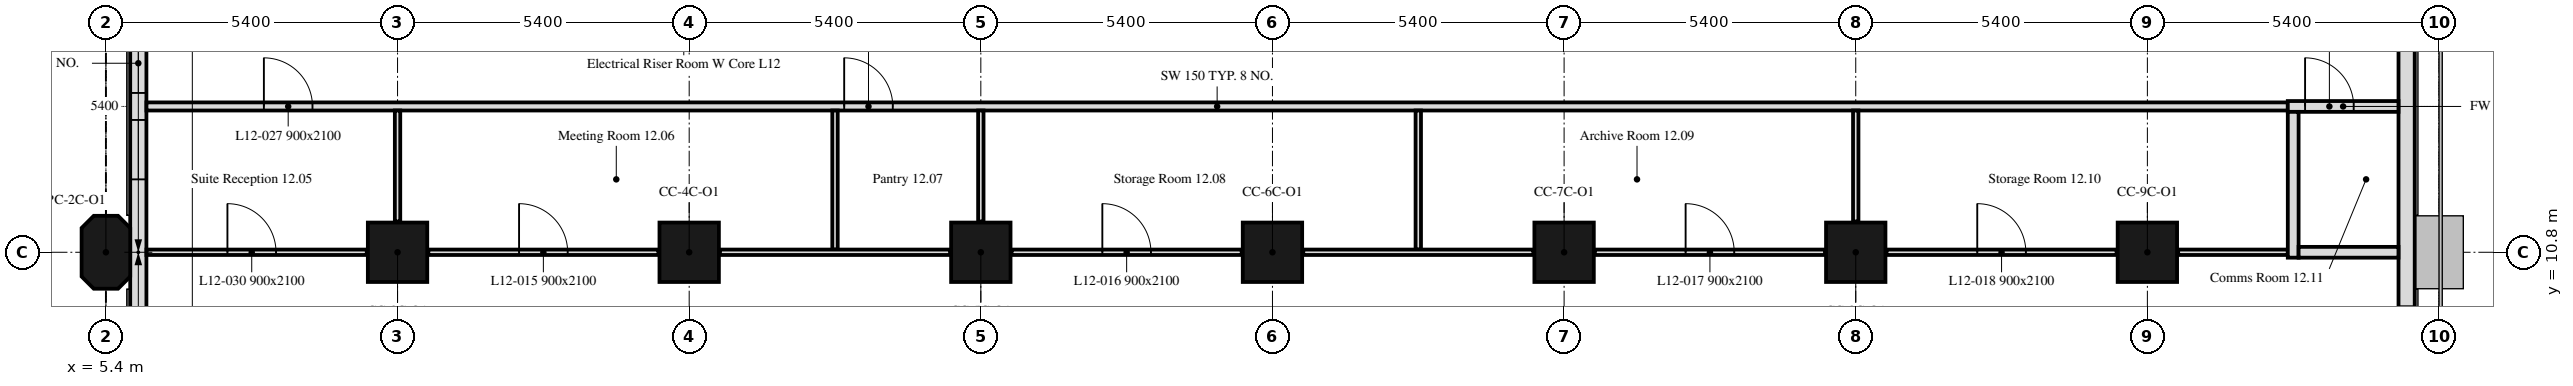
"""IFC4 building model, lengths in metres.
Left out: names, types, materials, properties, quantities, classifications, styles, units other than length and angle.
Written with IfcOpenShell. Run it as: python <this file> out.ifc"""

import sys

from ifc_helpers import new_model, si_unit, direction, frame, frame_2d, origin, origin_2d, place, context, subcontext, project, spatial, polyline, rectangle, outline, extrude, element, fill, save


model = new_model("IFC4")
c1 = context("Model", 3, precision=1e-05, world=origin(), true_north=direction((0.0, 1.0)))
c2 = subcontext(c1, "Body", "Model", "MODEL_VIEW")
j1 = project(units=[si_unit("LENGTHUNIT", "METRE"), si_unit("PLANEANGLEUNIT", "RADIAN")], contexts=[c1])
p1 = place(None, origin())
s1 = spatial("IfcSite", under=j1, at=p1, CompositionType="ELEMENT")
p2 = place(p1, origin())
s2 = spatial("IfcBuilding", under=s1, at=p2, CompositionType="ELEMENT")
p3 = place(p2, frame((0.0, 0.0, 56.4)))
s3 = spatial("IfcBuildingStorey", under=s2, at=p3, CompositionType="ELEMENT", Elevation=56.4)
p4 = place(p3, frame((5.4, 10.8, 0.0), z_axis=(0.0, 0.0, 1.0), x_axis=(0.0, 1.0, 0.0)))
e1 = element("IfcColumn", 1, at=p4, inside=s3, PredefinedType="COLUMN", context=c2, shape_type="SweptSolid", body=[
    extrude(outline(polyline([(-0.45, -0.45), (0.45, -0.45), (0.675, -0.225), (0.675, 0.225), (0.45, 0.45), (-0.45, 0.45), (-0.675, 0.225), (-0.675, -0.225), (-0.45, -0.45)])), origin(), (0.0, 0.0, 1.0), 3.3),
])
for number, where, z_axis, x_axis in (
    (2, (10.8, 10.8, 0.0), (0.0, 0.0, 1.0), (1.0, 0.0, 0.0)),
    (3, (16.2, 10.8, 0.0), (0.0, 0.0, 1.0), (1.0, 0.0, 0.0)),
    (4, (21.6, 10.8, 0.0), (0.0, 0.0, 1.0), (1.0, 0.0, 0.0)),
    (5, (27.0, 10.8, 0.0), (0.0, 0.0, 1.0), (1.0, 0.0, 0.0)),
    (6, (32.4, 10.8, 0.0), (0.0, 0.0, 1.0), (1.0, 0.0, 0.0)),
    (7, (37.8, 10.8, 0.0), (0.0, 0.0, 1.0), (1.0, 0.0, 0.0)),
    (8, (43.2, 10.8, 0.0), (0.0, 0.0, 1.0), (1.0, 0.0, 0.0)),
):
    element("IfcColumn", number, at=place(p3, frame(where, z_axis=z_axis, x_axis=x_axis)), inside=s3, PredefinedType="COLUMN", context=c2, shape_type="SweptSolid", body=[
        extrude(rectangle(XDim=1.1, YDim=1.1, at=origin_2d()), origin(), (0.0, 0.0, 1.0), 3.3),
    ])
p5 = place(p3, frame((48.0, 5.586, 0.0), z_axis=(0.0, 0.0, 1.0), x_axis=(0.0, 1.0, 0.0)))
e9 = element("IfcWall", 9, at=p5, inside=s3, PredefinedType="SOLIDWALL", context=c2, shape_type="SweptSolid", body=[
    extrude(rectangle(XDim=32.027, YDim=0.3, at=frame_2d((16.014, 0.0))), origin(), (0.0, 0.0, 1.0), 3.3),
])
p6 = place(p5, frame((0.814, 0.0, 0.9)))
e10 = element("IfcOpeningElement", 10, at=p6, cuts=e9, PredefinedType="OPENING", context=c2, shape_type="SweptSolid", body=[
    extrude(rectangle(XDim=3.4, YDim=1.7, at=frame_2d((1.7, 0.85))), frame((0.0, 0.16, 0.0), z_axis=(0.0, -1.0, 0.0), x_axis=(1.0, 0.0, 0.0)), (0.0, 0.0, 1.0), 0.32),
])
p7 = place(p5, frame((11.614, 0.0, 0.9)))
e11 = element("IfcOpeningElement", 11, at=p7, cuts=e9, PredefinedType="OPENING", context=c2, shape_type="SweptSolid", body=[
    extrude(rectangle(XDim=3.4, YDim=1.7, at=frame_2d((1.7, 0.85))), frame((0.0, 0.16, 0.0), z_axis=(0.0, -1.0, 0.0), x_axis=(1.0, 0.0, 0.0)), (0.0, 0.0, 1.0), 0.32),
])
p8 = place(p5, frame((22.414, 0.0, 0.9)))
e12 = element("IfcOpeningElement", 12, at=p8, cuts=e9, PredefinedType="OPENING", context=c2, shape_type="SweptSolid", body=[
    extrude(rectangle(XDim=3.4, YDim=1.7, at=frame_2d((1.7, 0.85))), frame((0.0, 0.16, 0.0), z_axis=(0.0, -1.0, 0.0), x_axis=(1.0, 0.0, 0.0)), (0.0, 0.0, 1.0), 0.32),
])
p9 = place(p3, frame((6.0, 16.2, 0.0), z_axis=(0.0, 0.0, 1.0), x_axis=(0.0, -1.0, 0.0)))
e13 = element("IfcWall", 13, at=p9, inside=s3, PredefinedType="SOLIDWALL", context=c2, shape_type="SweptSolid", body=[
    extrude(rectangle(XDim=10.614, YDim=0.3, at=frame_2d((5.307, 0.0))), origin(), (0.0, 0.0, 1.0), 3.3),
])
p10 = place(p9, frame((1.35, 0.0, 0.9)))
e14 = element("IfcOpeningElement", 14, at=p10, cuts=e13, PredefinedType="OPENING", context=c2, shape_type="SweptSolid", body=[
    extrude(rectangle(XDim=1.1, YDim=1.7, at=frame_2d((0.55, 0.85))), frame((0.0, 0.16, 0.0), z_axis=(0.0, -1.0, 0.0), x_axis=(1.0, 0.0, 0.0)), (0.0, 0.0, 1.0), 0.32),
])
p11 = place(p9, frame((2.95, 0.0, 0.9)))
e15 = element("IfcOpeningElement", 15, at=p11, cuts=e13, PredefinedType="OPENING", context=c2, shape_type="SweptSolid", body=[
    extrude(rectangle(XDim=1.1, YDim=1.7, at=frame_2d((0.55, 0.85))), frame((0.0, 0.16, 0.0), z_axis=(0.0, -1.0, 0.0), x_axis=(1.0, 0.0, 0.0)), (0.0, 0.0, 1.0), 0.32),
])
p12 = place(p3, frame((6.151, 13.5, 0.0), z_axis=(0.0, 0.0, 1.0), x_axis=(1.0, 0.0, 0.0)))
e16 = element("IfcWall", 16, at=p12, inside=s3, PredefinedType="PARTITIONING", context=c2, shape_type="SweptSolid", body=[
    extrude(rectangle(XDim=39.649, YDim=0.15, at=frame_2d((19.825, 0.0))), origin(), (0.0, 0.0, 1.0), 2.55),
])
p13 = place(p12, frame((12.919, 0.0, 0.0)))
e17 = element("IfcOpeningElement", 17, at=p13, cuts=e16, PredefinedType="OPENING", context=c2, shape_type="SweptSolid", body=[
    extrude(rectangle(XDim=0.9, YDim=2.1, at=frame_2d((0.45, 1.05))), frame((0.0, 0.075, 0.0), z_axis=(0.0, -1.0, 0.0), x_axis=(1.0, 0.0, 0.0)), (0.0, 0.0, 1.0), 0.15),
])
p14 = place(p12, frame((2.174, 0.0, 0.0)))
e18 = element("IfcOpeningElement", 18, at=p14, cuts=e16, PredefinedType="OPENING", context=c2, shape_type="SweptSolid", body=[
    extrude(rectangle(XDim=0.9, YDim=2.1, at=frame_2d((0.45, 1.05))), frame((0.0, 0.075, 0.0), z_axis=(0.0, -1.0, 0.0), x_axis=(1.0, 0.0, 0.0)), (0.0, 0.0, 1.0), 0.15),
])
p15 = place(p3, frame((45.8, 13.5, 0.0), z_axis=(0.0, 0.0, 1.0), x_axis=(1.0, 0.0, 0.0)))
e19 = element("IfcWall", 19, at=p15, inside=s3, PredefinedType="PARTITIONING", context=c2, shape_type="SweptSolid", body=[
    extrude(rectangle(XDim=2.049, YDim=0.2, at=frame_2d((1.024, 0.0))), origin(), (0.0, 0.0, 1.0), 3.3),
])
p16 = place(p15, frame((0.32, 0.0, 0.0)))
e20 = element("IfcOpeningElement", 20, at=p16, cuts=e19, PredefinedType="OPENING", context=c2, shape_type="SweptSolid", body=[
    extrude(rectangle(XDim=0.9, YDim=2.1, at=frame_2d((0.45, 1.05))), frame((0.0, 0.1, 0.0), z_axis=(0.0, -1.0, 0.0), x_axis=(1.0, 0.0, 0.0)), (0.0, 0.0, 1.0), 0.2),
])
p17 = place(p3, frame((6.151, 10.8, 0.0), z_axis=(0.0, 0.0, 1.0), x_axis=(1.0, 0.0, 0.0)))
e21 = element("IfcWall", 21, at=p17, inside=s3, PredefinedType="PARTITIONING", context=c2, shape_type="SweptSolid", body=[
    extrude(rectangle(XDim=4.079, YDim=0.1, at=frame_2d((2.04, 0.0))), origin(), (0.0, 0.0, 1.0), 3.3),
])
p18 = place(p17, frame((1.499, 0.0, 0.0)))
e22 = element("IfcOpeningElement", 22, at=p18, cuts=e21, PredefinedType="OPENING", context=c2, shape_type="SweptSolid", body=[
    extrude(rectangle(XDim=0.9, YDim=2.1, at=frame_2d((0.45, 1.05))), frame((0.0, 0.05, 0.0), z_axis=(0.0, -1.0, 0.0), x_axis=(1.0, 0.0, 0.0)), (0.0, 0.0, 1.0), 0.1),
])
p19 = place(p3, frame((10.8, 11.37, 0.0), z_axis=(0.0, 0.0, 1.0), x_axis=(0.0, 1.0, 0.0)))
e23 = element("IfcWall", 23, at=p19, inside=s3, PredefinedType="PARTITIONING", context=c2, shape_type="SweptSolid", body=[
    extrude(rectangle(XDim=2.055, YDim=0.1, at=frame_2d((1.027, 0.0))), origin(), (0.0, 0.0, 1.0), 3.3),
])
p20 = place(p3, frame((11.37, 10.8, 0.0), z_axis=(0.0, 0.0, 1.0), x_axis=(1.0, 0.0, 0.0)))
e24 = element("IfcWall", 24, at=p20, inside=s3, PredefinedType="PARTITIONING", context=c2, shape_type="SweptSolid", body=[
    extrude(rectangle(XDim=4.26, YDim=0.1, at=frame_2d((2.13, 0.0))), origin(), (0.0, 0.0, 1.0), 3.3),
])
p21 = place(p20, frame((1.68, 0.0, 0.0)))
e25 = element("IfcOpeningElement", 25, at=p21, cuts=e24, PredefinedType="OPENING", context=c2, shape_type="SweptSolid", body=[
    extrude(rectangle(XDim=0.9, YDim=2.1, at=frame_2d((0.45, 1.05))), frame((0.0, 0.05, 0.0), z_axis=(0.0, -1.0, 0.0), x_axis=(1.0, 0.0, 0.0)), (0.0, 0.0, 1.0), 0.1),
])
p22 = place(p3, frame((18.9, 10.85, 0.0), z_axis=(0.0, 0.0, 1.0), x_axis=(0.0, 1.0, 0.0)))
e26 = element("IfcWall", 26, at=p22, inside=s3, PredefinedType="PARTITIONING", context=c2, shape_type="SweptSolid", body=[
    extrude(rectangle(XDim=2.575, YDim=0.1, at=frame_2d((1.288, 0.0))), origin(), (0.0, 0.0, 1.0), 3.3),
])
p23 = place(p3, frame((16.77, 10.8, 0.0), z_axis=(0.0, 0.0, 1.0), x_axis=(1.0, 0.0, 0.0)))
e27 = element("IfcWall", 27, at=p23, inside=s3, PredefinedType="PARTITIONING", context=c2, shape_type="SweptSolid", body=[
    extrude(rectangle(XDim=4.26, YDim=0.1, at=frame_2d((2.13, 0.0))), origin(), (0.0, 0.0, 1.0), 3.3),
])
p24 = place(p3, frame((21.6, 11.37, 0.0), z_axis=(0.0, 0.0, 1.0), x_axis=(0.0, 1.0, 0.0)))
e28 = element("IfcWall", 28, at=p24, inside=s3, PredefinedType="PARTITIONING", context=c2, shape_type="SweptSolid", body=[
    extrude(rectangle(XDim=2.055, YDim=0.1, at=frame_2d((1.027, 0.0))), origin(), (0.0, 0.0, 1.0), 2.55),
])
p25 = place(p3, frame((22.17, 10.8, 0.0), z_axis=(0.0, 0.0, 1.0), x_axis=(1.0, 0.0, 0.0)))
e29 = element("IfcWall", 29, at=p25, inside=s3, PredefinedType="PARTITIONING", context=c2, shape_type="SweptSolid", body=[
    extrude(rectangle(XDim=4.26, YDim=0.1, at=frame_2d((2.13, 0.0))), origin(), (0.0, 0.0, 1.0), 3.3),
])
p26 = place(p25, frame((1.68, 0.0, 0.0)))
e30 = element("IfcOpeningElement", 30, at=p26, cuts=e29, PredefinedType="OPENING", context=c2, shape_type="SweptSolid", body=[
    extrude(rectangle(XDim=0.9, YDim=2.1, at=frame_2d((0.45, 1.05))), frame((0.0, 0.05, 0.0), z_axis=(0.0, -1.0, 0.0), x_axis=(1.0, 0.0, 0.0)), (0.0, 0.0, 1.0), 0.1),
])
p27 = place(p3, frame((29.7, 10.85, 0.0), z_axis=(0.0, 0.0, 1.0), x_axis=(0.0, 1.0, 0.0)))
e31 = element("IfcWall", 31, at=p27, inside=s3, PredefinedType="PARTITIONING", context=c2, shape_type="SweptSolid", body=[
    extrude(rectangle(XDim=2.575, YDim=0.1, at=frame_2d((1.288, 0.0))), origin(), (0.0, 0.0, 1.0), 3.3),
])
p28 = place(p3, frame((27.57, 10.8, 0.0), z_axis=(0.0, 0.0, 1.0), x_axis=(1.0, 0.0, 0.0)))
e32 = element("IfcWall", 32, at=p28, inside=s3, PredefinedType="PARTITIONING", context=c2, shape_type="SweptSolid", body=[
    extrude(rectangle(XDim=4.26, YDim=0.1, at=frame_2d((2.13, 0.0))), origin(), (0.0, 0.0, 1.0), 3.3),
])
p29 = place(p3, frame((32.97, 10.8, 0.0), z_axis=(0.0, 0.0, 1.0), x_axis=(1.0, 0.0, 0.0)))
e33 = element("IfcWall", 33, at=p29, inside=s3, PredefinedType="PARTITIONING", context=c2, shape_type="SweptSolid", body=[
    extrude(rectangle(XDim=4.26, YDim=0.1, at=frame_2d((2.13, 0.0))), origin(), (0.0, 0.0, 1.0), 2.55),
])
p30 = place(p29, frame((1.68, 0.0, 0.0)))
e34 = element("IfcOpeningElement", 34, at=p30, cuts=e33, PredefinedType="OPENING", context=c2, shape_type="SweptSolid", body=[
    extrude(rectangle(XDim=0.9, YDim=2.1, at=frame_2d((0.45, 1.05))), frame((0.0, 0.05, 0.0), z_axis=(0.0, -1.0, 0.0), x_axis=(1.0, 0.0, 0.0)), (0.0, 0.0, 1.0), 0.1),
])
p31 = place(p3, frame((37.8, 11.37, 0.0), z_axis=(0.0, 0.0, 1.0), x_axis=(0.0, 1.0, 0.0)))
e35 = element("IfcWall", 35, at=p31, inside=s3, PredefinedType="PARTITIONING", context=c2, shape_type="SweptSolid", body=[
    extrude(rectangle(XDim=2.055, YDim=0.1, at=frame_2d((1.027, 0.0))), origin(), (0.0, 0.0, 1.0), 2.55),
])
p32 = place(p3, frame((38.37, 10.8, 0.0), z_axis=(0.0, 0.0, 1.0), x_axis=(1.0, 0.0, 0.0)))
e36 = element("IfcWall", 36, at=p32, inside=s3, PredefinedType="PARTITIONING", context=c2, shape_type="SweptSolid", body=[
    extrude(rectangle(XDim=4.26, YDim=0.1, at=frame_2d((2.13, 0.0))), origin(), (0.0, 0.0, 1.0), 2.55),
])
p33 = place(p32, frame((1.68, 0.0, 0.0)))
e37 = element("IfcOpeningElement", 37, at=p33, cuts=e36, PredefinedType="OPENING", context=c2, shape_type="SweptSolid", body=[
    extrude(rectangle(XDim=0.9, YDim=2.1, at=frame_2d((0.45, 1.05))), frame((0.0, 0.05, 0.0), z_axis=(0.0, -1.0, 0.0), x_axis=(1.0, 0.0, 0.0)), (0.0, 0.0, 1.0), 0.1),
])
p34 = place(p3, frame((43.77, 10.8, 0.0), z_axis=(0.0, 0.0, 1.0), x_axis=(1.0, 0.0, 0.0)))
e38 = element("IfcWall", 38, at=p34, inside=s3, PredefinedType="PARTITIONING", context=c2, shape_type="SweptSolid", body=[
    extrude(rectangle(XDim=2.03, YDim=0.1, at=frame_2d((1.015, 0.0))), origin(), (0.0, 0.0, 1.0), 2.55),
])
p35 = place(p3, frame((45.9, 10.7, 0.0), z_axis=(0.0, 0.0, 1.0), x_axis=(0.0, 1.0, 0.0)))
e39 = element("IfcWall", 39, at=p35, inside=s3, PredefinedType="PARTITIONING", context=c2, shape_type="SweptSolid", body=[
    extrude(rectangle(XDim=2.7, YDim=0.2, at=frame_2d((1.35, 0.0))), origin(), (0.0, 0.0, 1.0), 2.55),
])
p36 = place(p3, frame((46.0, 10.8, 0.0), z_axis=(0.0, 0.0, 1.0), x_axis=(1.0, 0.0, 0.0)))
e40 = element("IfcWall", 40, at=p36, inside=s3, PredefinedType="PARTITIONING", context=c2, shape_type="SweptSolid", body=[
    extrude(rectangle(XDim=1.849, YDim=0.2, at=frame_2d((0.925, 0.0))), origin(), (0.0, 0.0, 1.0), 2.55),
])
p37 = place(p10, origin())
e41 = element("IfcWindow", 41, at=p37, inside=s3, PartitioningType="SINGLE_PANEL", PredefinedType="WINDOW", context=c2, shape_type="SweptSolid", body=[
    extrude(rectangle(XDim=1.1, YDim=1.7, at=frame_2d((0.55, 0.85))), frame((0.0, 0.03, 0.0), z_axis=(0.0, -1.0, 0.0), x_axis=(1.0, 0.0, 0.0)), (0.0, 0.0, 1.0), 0.06),
])
fill(e14, e41)
p38 = place(p11, origin())
e42 = element("IfcWindow", 42, at=p38, inside=s3, PartitioningType="SINGLE_PANEL", PredefinedType="WINDOW", context=c2, shape_type="SweptSolid", body=[
    extrude(rectangle(XDim=1.1, YDim=1.7, at=frame_2d((0.55, 0.85))), frame((0.0, 0.03, 0.0), z_axis=(0.0, -1.0, 0.0), x_axis=(1.0, 0.0, 0.0)), (0.0, 0.0, 1.0), 0.06),
])
fill(e15, e42)
p39 = place(p13, origin())
e43 = element("IfcDoor", 43, at=p39, inside=s3, OperationType="SINGLE_SWING_RIGHT", PredefinedType="DOOR", context=c2, shape_type="SweptSolid", body=[
    extrude(rectangle(XDim=0.9, YDim=2.1, at=frame_2d((0.45, 1.05))), frame((0.0, 0.025, 0.0), z_axis=(0.0, -1.0, 0.0), x_axis=(1.0, 0.0, 0.0)), (0.0, 0.0, 1.0), 0.05),
])
fill(e17, e43)
p40 = place(p16, origin())
e44 = element("IfcDoor", 44, at=p40, inside=s3, OperationType="SINGLE_SWING_LEFT", PredefinedType="DOOR", context=c2, shape_type="SweptSolid", body=[
    extrude(rectangle(XDim=0.9, YDim=2.1, at=frame_2d((0.45, 1.05))), frame((0.0, 0.025, 0.0), z_axis=(0.0, -1.0, 0.0), x_axis=(1.0, 0.0, 0.0)), (0.0, 0.0, 1.0), 0.05),
])
fill(e20, e44)
p41 = place(p21, origin())
e45 = element("IfcDoor", 45, at=p41, inside=s3, OperationType="SINGLE_SWING_RIGHT", PredefinedType="DOOR", context=c2, shape_type="SweptSolid", body=[
    extrude(rectangle(XDim=0.9, YDim=2.1, at=frame_2d((0.45, 1.05))), frame((0.0, 0.025, 0.0), z_axis=(0.0, -1.0, 0.0), x_axis=(1.0, 0.0, 0.0)), (0.0, 0.0, 1.0), 0.05),
])
fill(e25, e45)
p42 = place(p26, origin())
e46 = element("IfcDoor", 46, at=p42, inside=s3, OperationType="SINGLE_SWING_LEFT", PredefinedType="DOOR", context=c2, shape_type="SweptSolid", body=[
    extrude(rectangle(XDim=0.9, YDim=2.1, at=frame_2d((0.45, 1.05))), frame((0.0, 0.025, 0.0), z_axis=(0.0, -1.0, 0.0), x_axis=(1.0, 0.0, 0.0)), (0.0, 0.0, 1.0), 0.05),
])
fill(e30, e46)
p43 = place(p30, origin())
e47 = element("IfcDoor", 47, at=p43, inside=s3, OperationType="SINGLE_SWING_RIGHT", PredefinedType="DOOR", context=c2, shape_type="SweptSolid", body=[
    extrude(rectangle(XDim=0.9, YDim=2.1, at=frame_2d((0.45, 1.05))), frame((0.0, 0.025, 0.0), z_axis=(0.0, -1.0, 0.0), x_axis=(1.0, 0.0, 0.0)), (0.0, 0.0, 1.0), 0.05),
])
fill(e34, e47)
p44 = place(p33, origin())
e48 = element("IfcDoor", 48, at=p44, inside=s3, OperationType="SINGLE_SWING_LEFT", PredefinedType="DOOR", context=c2, shape_type="SweptSolid", body=[
    extrude(rectangle(XDim=0.9, YDim=2.1, at=frame_2d((0.45, 1.05))), frame((0.0, 0.025, 0.0), z_axis=(0.0, -1.0, 0.0), x_axis=(1.0, 0.0, 0.0)), (0.0, 0.0, 1.0), 0.05),
])
fill(e37, e48)
p45 = place(p14, origin())
e49 = element("IfcDoor", 49, at=p45, inside=s3, OperationType="SINGLE_SWING_RIGHT", PredefinedType="DOOR", context=c2, shape_type="SweptSolid", body=[
    extrude(rectangle(XDim=0.9, YDim=2.1, at=frame_2d((0.45, 1.05))), frame((0.0, 0.025, 0.0), z_axis=(0.0, -1.0, 0.0), x_axis=(1.0, 0.0, 0.0)), (0.0, 0.0, 1.0), 0.05),
])
fill(e18, e49)
p46 = place(p18, origin())
e50 = element("IfcDoor", 50, at=p46, inside=s3, OperationType="SINGLE_SWING_LEFT", PredefinedType="DOOR", context=c2, shape_type="SweptSolid", body=[
    extrude(rectangle(XDim=0.9, YDim=2.1, at=frame_2d((0.45, 1.05))), frame((0.0, 0.025, 0.0), z_axis=(0.0, -1.0, 0.0), x_axis=(1.0, 0.0, 0.0)), (0.0, 0.0, 1.0), 0.05),
])
fill(e22, e50)
save(model, sys.argv[1])
